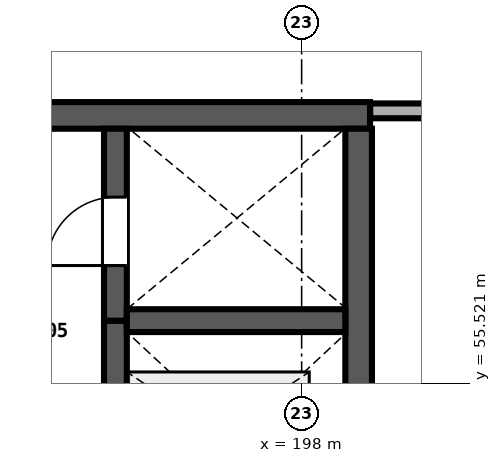
"""IFC4 building model, lengths in metres.
Left out: names, types, materials, properties, quantities, classifications, styles, units other than length and angle.
Written with IfcOpenShell. Run it as: python <this file> out.ifc"""

import sys

from ifc_helpers import new_model, si_unit, direction, frame, frame_2d, origin, place, context, subcontext, project, spatial, rectangle, extrude, element, fill, save


model = new_model("IFC4")
c1 = context("Model", 3, precision=1e-05, world=origin(), true_north=direction((0.0, 1.0)))
c2 = subcontext(c1, "Body", "Model", "MODEL_VIEW")
j1 = project(units=[si_unit("LENGTHUNIT", "METRE"), si_unit("PLANEANGLEUNIT", "RADIAN")], contexts=[c1])
p1 = place(None, origin())
s1 = spatial("IfcSite", under=j1, at=p1, CompositionType="ELEMENT")
p2 = place(p1, origin())
s2 = spatial("IfcBuilding", under=s1, at=p2, CompositionType="ELEMENT")
p3 = place(p2, frame((0.0, 0.0, 9.6)))
s3 = spatial("IfcBuildingStorey", under=s2, at=p3, CompositionType="ELEMENT", Elevation=9.6)
p4 = place(p3, frame((198.9, 59.05, 0.0), z_axis=(0.0, 0.0, 1.0), x_axis=(-1.0, 0.0, 0.0)))
e1 = element("IfcWall", 1, at=p4, inside=s3, PredefinedType="SHEAR", context=c2, shape_type="SweptSolid", body=[
    extrude(rectangle(XDim=18.0, YDim=0.35, at=frame_2d((9.0, 0.0))), origin(), (0.0, 0.0, 1.0), 4.5),
])
p5 = place(p4, frame((4.7, 0.0, 0.0)))
e2 = element("IfcOpeningElement", 2, at=p5, cuts=e1, PredefinedType="OPENING", context=c2, shape_type="SweptSolid", body=[
    extrude(rectangle(XDim=1.9, YDim=2.25, at=frame_2d((0.95, 1.125))), frame((0.0, 0.185, 0.0), z_axis=(0.0, -1.0, 0.0), x_axis=(1.0, 0.0, 0.0)), (0.0, 0.0, 1.0), 0.37),
])
p6 = place(p3, frame((198.75, 53.525, 0.0), z_axis=(0.0, 0.0, 1.0), x_axis=(0.0, 1.0, 0.0)))
e3 = element("IfcWall", 3, at=p6, inside=s3, PredefinedType="SHEAR", context=c2, shape_type="SweptSolid", body=[
    extrude(rectangle(XDim=5.35, YDim=0.35, at=frame_2d((2.675, 0.0))), origin(), (0.0, 0.0, 1.0), 4.5),
])
p7 = place(p3, frame((195.55, 53.525, 0.0), z_axis=(0.0, 0.0, 1.0), x_axis=(0.0, 1.0, 0.0)))
e4 = element("IfcWall", 4, at=p7, inside=s3, PredefinedType="SHEAR", context=c2, shape_type="SweptSolid", body=[
    extrude(rectangle(XDim=2.825, YDim=0.3, at=frame_2d((1.413, 0.0))), origin(), (0.0, 0.0, 1.0), 4.5),
])
p8 = place(p7, frame((0.775, 0.0, 0.0)))
e5 = element("IfcOpeningElement", 5, at=p8, cuts=e4, PredefinedType="OPENING", context=c2, shape_type="SweptSolid", body=[
    extrude(rectangle(XDim=1.1, YDim=2.1, at=frame_2d((0.55, 1.05))), frame((0.0, 0.16, 0.0), z_axis=(0.0, -1.0, 0.0), x_axis=(1.0, 0.0, 0.0)), (0.0, 0.0, 1.0), 0.32),
])
p9 = place(p3, frame((195.55, 56.35, 0.0), z_axis=(0.0, 0.0, 1.0), x_axis=(0.0, 1.0, 0.0)))
e6 = element("IfcWall", 6, at=p9, inside=s3, PredefinedType="SHEAR", context=c2, shape_type="SweptSolid", body=[
    extrude(rectangle(XDim=2.525, YDim=0.3, at=frame_2d((1.262, 0.0))), origin(), (0.0, 0.0, 1.0), 4.5),
])
p10 = place(p9, frame((0.725, 0.0, 0.0)))
e7 = element("IfcOpeningElement", 7, at=p10, cuts=e6, PredefinedType="OPENING", context=c2, shape_type="SweptSolid", body=[
    extrude(rectangle(XDim=0.9, YDim=2.1, at=frame_2d((0.45, 1.05))), frame((0.0, 0.16, 0.0), z_axis=(0.0, -1.0, 0.0), x_axis=(1.0, 0.0, 0.0)), (0.0, 0.0, 1.0), 0.32),
])
p11 = place(p3, frame((195.7, 56.35, 0.0), z_axis=(0.0, 0.0, 1.0), x_axis=(1.0, 0.0, 0.0)))
e8 = element("IfcWall", 8, at=p11, inside=s3, PredefinedType="SHEAR", context=c2, shape_type="SweptSolid", body=[
    extrude(rectangle(XDim=2.875, YDim=0.3, at=frame_2d((1.438, 0.0))), origin(), (0.0, 0.0, 1.0), 4.5),
])
p12 = place(p3, frame((198.902, 59.11, 0.0), z_axis=(0.0, 0.0, 1.0), x_axis=(1.0, 0.0, 0.0)))
e9 = element("IfcWall", 9, at=p12, inside=s3, PredefinedType="PARTITIONING", context=c2, shape_type="SweptSolid", body=[
    extrude(rectangle(XDim=2.038, YDim=0.195, at=frame_2d((1.019, 0.0))), origin(), (0.0, 0.0, 1.0), 3.56),
])
p13 = place(p10, origin())
e10 = element("IfcDoor", 10, at=p13, inside=s3, OperationType="SINGLE_SWING_LEFT", PredefinedType="DOOR", context=c2, shape_type="SweptSolid", body=[
    extrude(rectangle(XDim=0.9, YDim=2.1, at=frame_2d((0.45, 1.05))), frame((0.0, 0.025, 0.0), z_axis=(0.0, -1.0, 0.0), x_axis=(1.0, 0.0, 0.0)), (0.0, 0.0, 1.0), 0.05),
])
fill(e7, e10)
save(model, sys.argv[1])
